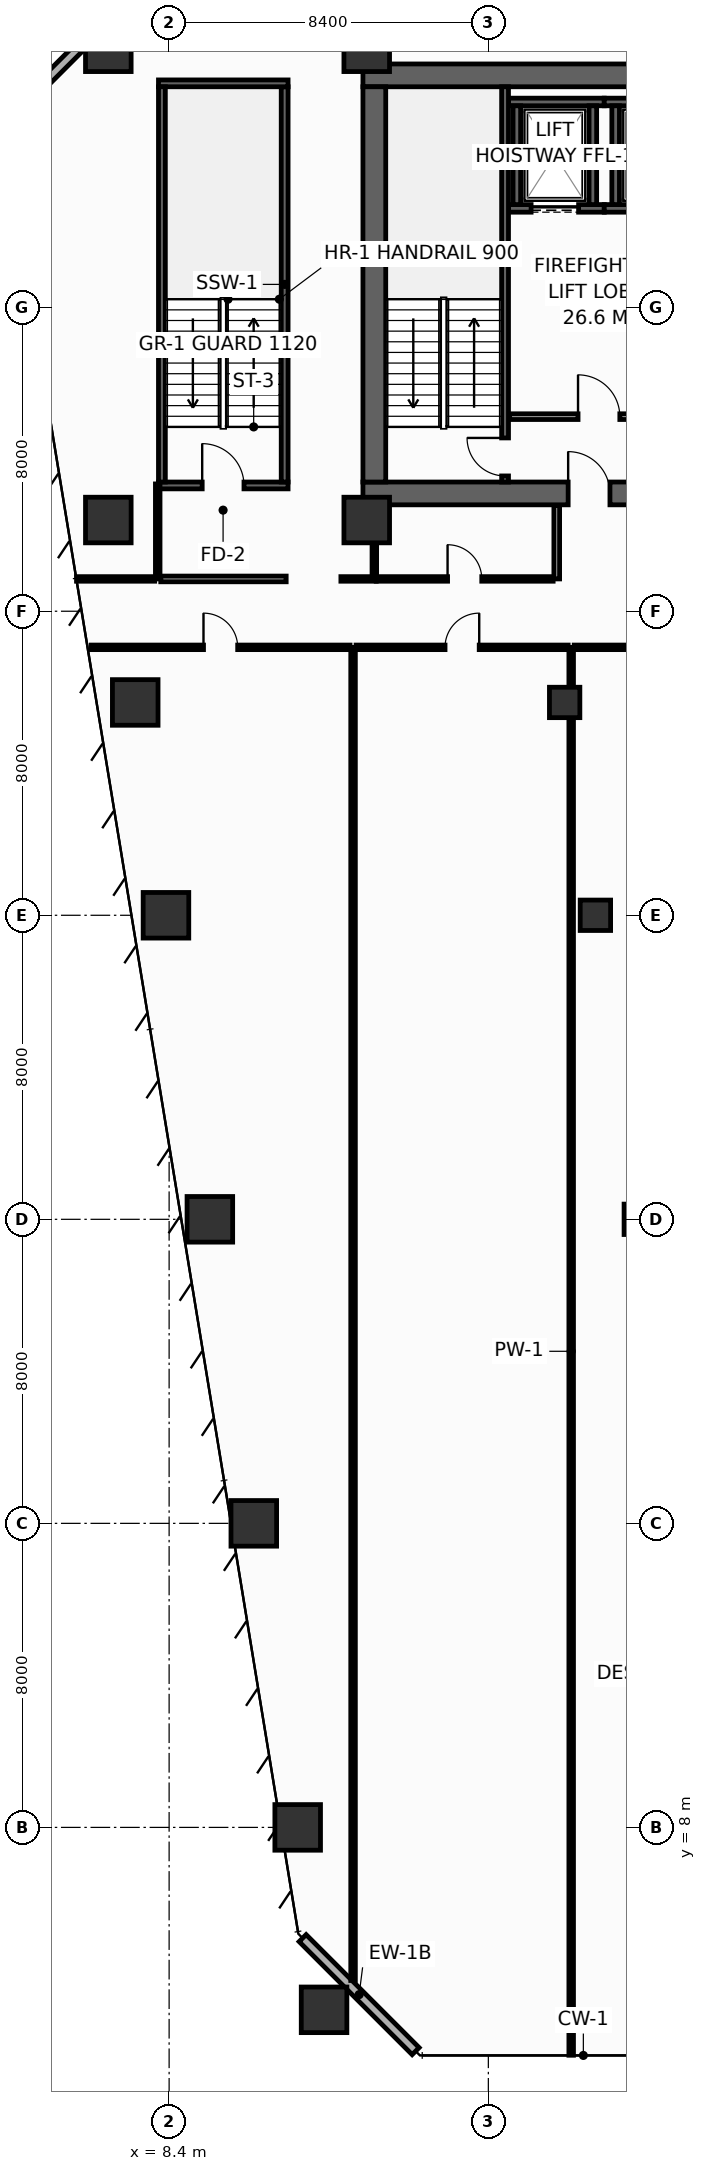
"""IFC4 building model, lengths in metres.
Left out: names, types, materials, properties, quantities, classifications, styles, units other than length and angle.
Written with IfcOpenShell. Run it as: python <this file> out.ifc"""

import sys

from ifc_helpers import new_model, si_unit, direction, frame, frame_2d, origin, origin_2d, place, context, subcontext, project, spatial, rectangle, hollow_rectangle, extrude, element, fill, save


model = new_model("IFC4")
c1 = context("Model", 3, precision=1e-05, world=origin(), true_north=direction((0.0, 1.0)))
c2 = subcontext(c1, "Body", "Model", "MODEL_VIEW")
j1 = project(units=[si_unit("LENGTHUNIT", "METRE"), si_unit("PLANEANGLEUNIT", "RADIAN")], contexts=[c1])
p1 = place(None, origin())
s1 = spatial("IfcSite", under=j1, at=p1, CompositionType="ELEMENT")
p2 = place(p1, origin())
s2 = spatial("IfcBuilding", under=s1, at=p2, CompositionType="ELEMENT")
p3 = place(p2, frame((0.0, 0.0, 73.6)))
s3 = spatial("IfcBuildingStorey", under=s2, at=p3, CompositionType="ELEMENT", Elevation=73.6)
p4 = place(p3, frame((13.5, 43.1, 0.0), z_axis=(0.0, 0.0, 1.0), x_axis=(1.0, 0.0, 0.0)))
e1 = element("IfcWall", 1, at=p4, inside=s3, PredefinedType="SHEAR", context=c2, shape_type="SweptSolid", body=[
    extrude(rectangle(XDim=32.9, YDim=0.6, at=frame_2d((16.45, 0.0))), origin(), (0.0, 0.0, 1.0), 4.15),
])
p5 = place(p4, frame((5.4, 0.0, 0.0)))
e2 = element("IfcOpeningElement", 2, at=p5, cuts=e1, PredefinedType="OPENING", context=c2, shape_type="SweptSolid", body=[
    extrude(rectangle(XDim=1.1, YDim=2.15, at=frame_2d((0.55, 1.075))), frame((0.0, 0.31, 0.0), z_axis=(0.0, -1.0, 0.0), x_axis=(1.0, 0.0, 0.0)), (0.0, 0.0, 1.0), 0.62),
])
p6 = place(p4, frame((25.6, 0.0, 0.0)))
e3 = element("IfcOpeningElement", 3, at=p6, cuts=e1, PredefinedType="OPENING", context=c2, shape_type="SweptSolid", body=[
    extrude(rectangle(XDim=1.1, YDim=2.15, at=frame_2d((0.55, 1.075))), frame((0.0, 0.31, 0.0), z_axis=(0.0, -1.0, 0.0), x_axis=(1.0, 0.0, 0.0)), (0.0, 0.0, 1.0), 0.62),
])
p7 = place(p3, frame((13.5, 54.1, 0.0), z_axis=(0.0, 0.0, 1.0), x_axis=(1.0, 0.0, 0.0)))
e4 = element("IfcWall", 4, at=p7, inside=s3, PredefinedType="SHEAR", context=c2, shape_type="SweptSolid", body=[
    extrude(rectangle(XDim=32.9, YDim=0.6, at=frame_2d((16.45, 0.0))), origin(), (0.0, 0.0, 1.0), 4.15),
])
p8 = place(p3, frame((13.8, 43.4, 0.0), z_axis=(0.0, 0.0, 1.0), x_axis=(0.0, 1.0, 0.0)))
e5 = element("IfcWall", 5, at=p8, inside=s3, PredefinedType="SHEAR", context=c2, shape_type="SweptSolid", body=[
    extrude(rectangle(XDim=10.4, YDim=0.6, at=frame_2d((5.2, 0.0))), origin(), (0.0, 0.0, 1.0), 4.15),
])
for number, where, z_axis, x_axis in (
    (6, (6.8, 54.8, 0.0), (0.0, 0.0, 1.0), (1.0, 0.0, 0.0)),
    (7, (13.6, 54.8, 0.0), (0.0, 0.0, 1.0), (1.0, 0.0, 0.0)),
    (8, (6.8, 42.4, 0.0), (0.0, 0.0, 1.0), (1.0, 0.0, 0.0)),
    (9, (13.6, 42.4, 0.0), (0.0, 0.0, 1.0), (1.0, 0.0, 0.0)),
    (10, (12.477, 3.2, 0.0), (0.0, 0.0, 1.0), (1.0, 0.0, 0.0)),
    (11, (11.783, 8.0, 0.0), (0.0, 0.0, 1.0), (1.0, 0.0, 0.0)),
    (12, (10.628, 16.0, 0.0), (0.0, 0.0, 1.0), (1.0, 0.0, 0.0)),
    (13, (9.472, 24.0, 0.0), (0.0, 0.0, 1.0), (1.0, 0.0, 0.0)),
):
    element("IfcColumn", number, at=place(p3, frame(where, z_axis=z_axis, x_axis=x_axis)), inside=s3, PredefinedType="COLUMN", context=c2, shape_type="SweptSolid", body=[
        extrude(hollow_rectangle(XDim=1.2, YDim=1.2, WallThickness=0.055, at=origin_2d()), origin(), (0.0, 0.0, 1.0), 4.4),
    ])
p9 = place(p3, frame((20.772, 24.0, 0.0), z_axis=(0.0, 0.0, 1.0), x_axis=(1.0, 0.0, 0.0)))
e14 = element("IfcColumn", 14, at=p9, inside=s3, PredefinedType="COLUMN", context=c2, shape_type="SweptSolid", body=[
    extrude(hollow_rectangle(XDim=0.8, YDim=0.8, WallThickness=0.036, at=origin_2d()), origin(), (0.0, 0.0, 1.0), 4.4),
])
p10 = place(p3, frame((8.317, 32.0, 0.0), z_axis=(0.0, 0.0, 1.0), x_axis=(1.0, 0.0, 0.0)))
e15 = element("IfcColumn", 15, at=p10, inside=s3, PredefinedType="COLUMN", context=c2, shape_type="SweptSolid", body=[
    extrude(hollow_rectangle(XDim=1.2, YDim=1.2, WallThickness=0.055, at=origin_2d()), origin(), (0.0, 0.0, 1.0), 4.4),
])
p11 = place(p3, frame((19.617, 32.0, 0.0), z_axis=(0.0, 0.0, 1.0), x_axis=(1.0, 0.0, 0.0)))
e16 = element("IfcColumn", 16, at=p11, inside=s3, PredefinedType="COLUMN", context=c2, shape_type="SweptSolid", body=[
    extrude(hollow_rectangle(XDim=0.8, YDim=0.8, WallThickness=0.036, at=origin_2d()), origin(), (0.0, 0.0, 1.0), 4.4),
])
p12 = place(p3, frame((7.508, 37.6, 0.0), z_axis=(0.0, 0.0, 1.0), x_axis=(1.0, 0.0, 0.0)))
e17 = element("IfcColumn", 17, at=p12, inside=s3, PredefinedType="COLUMN", context=c2, shape_type="SweptSolid", body=[
    extrude(hollow_rectangle(XDim=1.2, YDim=1.2, WallThickness=0.055, at=origin_2d()), origin(), (0.0, 0.0, 1.0), 4.4),
])
p13 = place(p3, frame((18.808, 37.6, 0.0), z_axis=(0.0, 0.0, 1.0), x_axis=(1.0, 0.0, 0.0)))
e18 = element("IfcColumn", 18, at=p13, inside=s3, PredefinedType="COLUMN", context=c2, shape_type="SweptSolid", body=[
    extrude(hollow_rectangle(XDim=0.8, YDim=0.8, WallThickness=0.036, at=origin_2d()), origin(), (0.0, 0.0, 1.0), 4.4),
])
p14 = place(p3, frame((17.33, 50.6, 0.0), z_axis=(0.0, 0.0, 1.0), x_axis=(1.0, 0.0, 0.0)))
e19 = element("IfcWall", 19, at=p14, inside=s3, PredefinedType="SHEAR", context=c2, shape_type="SweptSolid", body=[
    extrude(rectangle(XDim=2.52, YDim=0.2, at=frame_2d((1.26, 0.0))), origin(), (0.0, 0.0, 1.0), 4.15),
])
p15 = place(p14, frame((0.595, 0.0, 0.0)))
e20 = element("IfcOpeningElement", 20, at=p15, cuts=e19, PredefinedType="OPENING", context=c2, shape_type="SweptSolid", body=[
    extrude(rectangle(XDim=1.25, YDim=2.3, at=frame_2d((0.625, 1.15))), frame((0.0, 0.11, 0.0), z_axis=(0.0, -1.0, 0.0), x_axis=(1.0, 0.0, 0.0)), (0.0, 0.0, 1.0), 0.22),
])
p16 = place(p3, frame((17.33, 53.4, 0.0), z_axis=(0.0, 0.0, 1.0), x_axis=(1.0, 0.0, 0.0)))
e21 = element("IfcWall", 21, at=p16, inside=s3, PredefinedType="SHEAR", context=c2, shape_type="SweptSolid", body=[
    extrude(rectangle(XDim=2.52, YDim=0.2, at=frame_2d((1.26, 0.0))), origin(), (0.0, 0.0, 1.0), 4.15),
])
for number, where, z_axis, x_axis in (
    (22, (17.55, 50.7, 0.0), (0.0, 0.0, 1.0), (0.0, 1.0, 0.0)),
    (23, (19.55, 50.7, 0.0), (0.0, 0.0, 1.0), (0.0, 1.0, 0.0)),
):
    element("IfcWall", number, at=place(p3, frame(where, z_axis=z_axis, x_axis=x_axis)), inside=s3, PredefinedType="SHEAR", context=c2, shape_type="SweptSolid", body=[
        extrude(rectangle(XDim=2.6, YDim=0.2, at=frame_2d((1.3, 0.0))), origin(), (0.0, 0.0, 1.0), 4.15),
    ])
p17 = place(p3, frame((19.85, 50.6, 0.0), z_axis=(0.0, 0.0, 1.0), x_axis=(1.0, 0.0, 0.0)))
e24 = element("IfcWall", 24, at=p17, inside=s3, PredefinedType="SHEAR", context=c2, shape_type="SweptSolid", body=[
    extrude(rectangle(XDim=2.65, YDim=0.2, at=frame_2d((1.325, 0.0))), origin(), (0.0, 0.0, 1.0), 4.15),
])
p18 = place(p17, frame((0.675, 0.0, 0.0)))
e25 = element("IfcOpeningElement", 25, at=p18, cuts=e24, PredefinedType="OPENING", context=c2, shape_type="SweptSolid", body=[
    extrude(rectangle(XDim=1.25, YDim=2.3, at=frame_2d((0.625, 1.15))), frame((0.0, 0.11, 0.0), z_axis=(0.0, -1.0, 0.0), x_axis=(1.0, 0.0, 0.0)), (0.0, 0.0, 1.0), 0.22),
])
p19 = place(p3, frame((19.85, 53.4, 0.0), z_axis=(0.0, 0.0, 1.0), x_axis=(1.0, 0.0, 0.0)))
e26 = element("IfcWall", 26, at=p19, inside=s3, PredefinedType="SHEAR", context=c2, shape_type="SweptSolid", body=[
    extrude(rectangle(XDim=2.65, YDim=0.2, at=frame_2d((1.325, 0.0))), origin(), (0.0, 0.0, 1.0), 4.15),
])
p20 = place(p3, frame((20.15, 50.7, 0.0), z_axis=(0.0, 0.0, 1.0), x_axis=(0.0, 1.0, 0.0)))
e27 = element("IfcWall", 27, at=p20, inside=s3, PredefinedType="SHEAR", context=c2, shape_type="SweptSolid", body=[
    extrude(rectangle(XDim=2.6, YDim=0.2, at=frame_2d((1.3, 0.0))), origin(), (0.0, 0.0, 1.0), 4.15),
])
p21 = place(p3, frame((17.24, 43.4, 0.0), z_axis=(0.0, 0.0, 1.0), x_axis=(0.0, 1.0, 0.0)))
e28 = element("IfcWall", 28, at=p21, inside=s3, PredefinedType="SHEAR", context=c2, shape_type="SweptSolid", body=[
    extrude(rectangle(XDim=10.4, YDim=0.18, at=frame_2d((5.2, 0.0))), origin(), (0.0, 0.0, 1.0), 4.15),
])
p22 = place(p21, frame((0.16, 0.0, 0.0)))
e29 = element("IfcOpeningElement", 29, at=p22, cuts=e28, PredefinedType="OPENING", context=c2, shape_type="SweptSolid", body=[
    extrude(rectangle(XDim=1.0, YDim=2.15, at=frame_2d((0.5, 1.075))), frame((0.0, 0.1, 0.0), z_axis=(0.0, -1.0, 0.0), x_axis=(1.0, 0.0, 0.0)), (0.0, 0.0, 1.0), 0.2),
])
p23 = place(p3, frame((8.12, 43.31, 0.0), z_axis=(0.0, 0.0, 1.0), x_axis=(1.0, 0.0, 0.0)))
e30 = element("IfcWall", 30, at=p23, inside=s3, PredefinedType="SHEAR", context=c2, shape_type="SweptSolid", body=[
    extrude(rectangle(XDim=3.41, YDim=0.18, at=frame_2d((1.705, 0.0))), origin(), (0.0, 0.0, 1.0), 4.15),
])
p24 = place(p23, frame((1.15, 0.0, 0.0)))
e31 = element("IfcOpeningElement", 31, at=p24, cuts=e30, PredefinedType="OPENING", context=c2, shape_type="SweptSolid", body=[
    extrude(rectangle(XDim=1.1, YDim=2.15, at=frame_2d((0.55, 1.075))), frame((0.0, 0.1, 0.0), z_axis=(0.0, -1.0, 0.0), x_axis=(1.0, 0.0, 0.0)), (0.0, 0.0, 1.0), 0.2),
])
p25 = place(p3, frame((11.44, 43.4, 0.0), z_axis=(0.0, 0.0, 1.0), x_axis=(0.0, 1.0, 0.0)))
e32 = element("IfcWall", 32, at=p25, inside=s3, PredefinedType="SHEAR", context=c2, shape_type="SweptSolid", body=[
    extrude(rectangle(XDim=10.4, YDim=0.18, at=frame_2d((5.2, 0.0))), origin(), (0.0, 0.0, 1.0), 4.15),
])
p26 = place(p3, frame((11.53, 53.89, 0.0), z_axis=(0.0, 0.0, 1.0), x_axis=(-1.0, 0.0, 0.0)))
e33 = element("IfcWall", 33, at=p26, inside=s3, PredefinedType="SHEAR", context=c2, shape_type="SweptSolid", body=[
    extrude(rectangle(XDim=3.41, YDim=0.18, at=frame_2d((1.705, 0.0))), origin(), (0.0, 0.0, 1.0), 4.15),
])
p27 = place(p3, frame((8.21, 53.8, 0.0), z_axis=(0.0, 0.0, 1.0), x_axis=(0.0, -1.0, 0.0)))
e34 = element("IfcWall", 34, at=p27, inside=s3, PredefinedType="SHEAR", context=c2, shape_type="SweptSolid", body=[
    extrude(rectangle(XDim=10.4, YDim=0.18, at=frame_2d((5.2, 0.0))), origin(), (0.0, 0.0, 1.0), 4.15),
])
p28 = place(p3, frame((17.36, 45.12, 0.0), z_axis=(0.0, 0.0, 1.0), x_axis=(1.0, 0.0, 0.0)))
e35 = element("IfcWall", 35, at=p28, inside=s3, PredefinedType="PARTITIONING", context=c2, shape_type="SweptSolid", body=[
    extrude(rectangle(XDim=5.14, YDim=0.15, at=frame_2d((2.57, 0.0))), origin(), (0.0, 0.0, 1.0), 4.15),
])
p29 = place(p28, frame((1.8, 0.0, 0.0)))
e36 = element("IfcOpeningElement", 36, at=p29, cuts=e35, PredefinedType="OPENING", context=c2, shape_type="SweptSolid", body=[
    extrude(rectangle(XDim=1.1, YDim=2.15, at=frame_2d((0.55, 1.075))), frame((0.0, 0.085, 0.0), z_axis=(0.0, -1.0, 0.0), x_axis=(1.0, 0.0, 0.0)), (0.0, 0.0, 1.0), 0.17),
])
for number, where, z_axis, x_axis in (
    (37, (11.913, 5.087, 0.0), (0.0, 0.0, 1.0), (0.707, -0.707, 0.0)),
    (38, (7.087, 55.887, 0.0), (0.0, 0.0, 1.0), (-0.707, -0.707, 0.0)),
):
    element("IfcWall", number, at=place(p3, frame(where, z_axis=z_axis, x_axis=x_axis)), inside=s3, PredefinedType="STANDARD", context=c2, shape_type="SweptSolid", body=[
        extrude(rectangle(XDim=4.206, YDim=0.26, at=frame_2d((2.103, 0.0))), origin(), (0.0, 0.0, 1.0), 4.15),
    ])
p30 = place(p3, frame((12.92, 40.85, 0.0), z_axis=(0.0, 0.0, 1.0), x_axis=(1.0, 0.0, 0.0)))
e39 = element("IfcWall", 39, at=p30, inside=s3, PredefinedType="PARTITIONING", context=c2, shape_type="SweptSolid", body=[
    extrude(rectangle(XDim=0.93, YDim=0.12, at=frame_2d((0.465, 0.0))), origin(), (0.0, 0.0, 1.0), 4.15),
])
p31 = place(p3, frame((13.8, 40.93, 0.0), z_axis=(0.0, 0.0, 1.0), x_axis=(0.0, 1.0, 0.0)))
e40 = element("IfcWall", 40, at=p31, inside=s3, PredefinedType="PARTITIONING", context=c2, shape_type="SweptSolid", body=[
    extrude(rectangle(XDim=1.85, YDim=0.12, at=frame_2d((0.925, 0.0))), origin(), (0.0, 0.0, 1.0), 4.15),
])
p32 = place(p3, frame((8.1, 40.85, 0.0), z_axis=(0.0, 0.0, 1.0), x_axis=(0.0, 1.0, 0.0)))
e41 = element("IfcWall", 41, at=p32, inside=s3, PredefinedType="PARTITIONING", context=c2, shape_type="SweptSolid", body=[
    extrude(rectangle(XDim=2.5, YDim=0.12, at=frame_2d((1.25, 0.0))), origin(), (0.0, 0.0, 1.0), 3.335),
])
p33 = place(p3, frame((8.18, 40.85, 0.0), z_axis=(0.0, 0.0, 1.0), x_axis=(1.0, 0.0, 0.0)))
e42 = element("IfcWall", 42, at=p33, inside=s3, PredefinedType="PARTITIONING", context=c2, shape_type="SweptSolid", body=[
    extrude(rectangle(XDim=3.3, YDim=0.15, at=frame_2d((1.65, 0.0))), origin(), (0.0, 0.0, 1.0), 4.15),
])
p34 = place(p3, frame((5.963, 40.85, 0.0), z_axis=(0.0, 0.0, 1.0), x_axis=(1.0, 0.0, 0.0)))
e43 = element("IfcWall", 43, at=p34, inside=s3, PredefinedType="PARTITIONING", context=c2, shape_type="SweptSolid", body=[
    extrude(rectangle(XDim=2.057, YDim=0.12, at=frame_2d((1.028, 0.0))), origin(), (0.0, 0.0, 1.0), 3.635),
])
p35 = place(p3, frame((18.6, 40.85, 0.0), z_axis=(0.0, 0.0, 1.0), x_axis=(0.0, 1.0, 0.0)))
e44 = element("IfcWall", 44, at=p35, inside=s3, PredefinedType="PARTITIONING", context=c2, shape_type="SweptSolid", body=[
    extrude(rectangle(XDim=1.93, YDim=0.15, at=frame_2d((0.965, 0.0))), origin(), (0.0, 0.0, 1.0), 4.15),
])
p36 = place(p3, frame((13.85, 40.85, 0.0), z_axis=(0.0, 0.0, 1.0), x_axis=(1.0, 0.0, 0.0)))
e45 = element("IfcWall", 45, at=p36, inside=s3, PredefinedType="PARTITIONING", context=c2, shape_type="SweptSolid", body=[
    extrude(rectangle(XDim=4.655, YDim=0.12, at=frame_2d((2.327, 0.0))), origin(), (0.0, 0.0, 1.0), 4.15),
])
p37 = place(p36, frame((1.877, 0.0, 0.0)))
e46 = element("IfcOpeningElement", 46, at=p37, cuts=e45, PredefinedType="OPENING", context=c2, shape_type="SweptSolid", body=[
    extrude(rectangle(XDim=0.9, YDim=2.1, at=frame_2d((0.45, 1.05))), frame((0.0, 0.07, 0.0), z_axis=(0.0, -1.0, 0.0), x_axis=(1.0, 0.0, 0.0)), (0.0, 0.0, 1.0), 0.14),
])
p38 = place(p3, frame((13.24, 3.972, 0.0), z_axis=(0.0, 0.0, 1.0), x_axis=(0.0, 1.0, 0.0)))
e47 = element("IfcWall", 47, at=p38, inside=s3, PredefinedType="PARTITIONING", context=c2, shape_type="SweptSolid", body=[
    extrude(rectangle(XDim=35.078, YDim=0.12, at=frame_2d((17.539, 0.0))), origin(), (0.0, 0.0, 1.0), 3.335),
])
p39 = place(p3, frame((18.98, 2.005, 0.0), z_axis=(0.0, 0.0, 1.0), x_axis=(0.0, 1.0, 0.0)))
e48 = element("IfcWall", 48, at=p39, inside=s3, PredefinedType="PARTITIONING", context=c2, shape_type="SweptSolid", body=[
    extrude(rectangle(XDim=37.045, YDim=0.12, at=frame_2d((18.522, 0.0))), origin(), (0.0, 0.0, 1.0), 3.335),
])
p40 = place(p3, frame((6.348, 39.05, 0.0), z_axis=(0.0, 0.0, 1.0), x_axis=(1.0, 0.0, 0.0)))
e49 = element("IfcWall", 49, at=p40, inside=s3, PredefinedType="PARTITIONING", context=c2, shape_type="SweptSolid", body=[
    extrude(rectangle(XDim=6.812, YDim=0.12, at=frame_2d((3.406, 0.0))), origin(), (0.0, 0.0, 1.0), 3.635),
])
p41 = place(p40, frame((2.956, 0.0, 0.0)))
e50 = element("IfcOpeningElement", 50, at=p41, cuts=e49, PredefinedType="OPENING", context=c2, shape_type="SweptSolid", body=[
    extrude(rectangle(XDim=0.9, YDim=2.1, at=frame_2d((0.45, 1.05))), frame((0.0, 0.07, 0.0), z_axis=(0.0, -1.0, 0.0), x_axis=(1.0, 0.0, 0.0)), (0.0, 0.0, 1.0), 0.14),
])
p42 = place(p3, frame((13.32, 39.05, 0.0), z_axis=(0.0, 0.0, 1.0), x_axis=(1.0, 0.0, 0.0)))
e51 = element("IfcWall", 51, at=p42, inside=s3, PredefinedType="PARTITIONING", context=c2, shape_type="SweptSolid", body=[
    extrude(rectangle(XDim=5.58, YDim=0.12, at=frame_2d((2.79, 0.0))), origin(), (0.0, 0.0, 1.0), 4.15),
])
p43 = place(p42, frame((2.34, 0.0, 0.0)))
e52 = element("IfcOpeningElement", 52, at=p43, cuts=e51, PredefinedType="OPENING", context=c2, shape_type="SweptSolid", body=[
    extrude(rectangle(XDim=0.9, YDim=2.1, at=frame_2d((0.45, 1.05))), frame((0.0, 0.07, 0.0), z_axis=(0.0, -1.0, 0.0), x_axis=(1.0, 0.0, 0.0)), (0.0, 0.0, 1.0), 0.14),
])
p44 = place(p3, frame((19.06, 39.05, 0.0), z_axis=(0.0, 0.0, 1.0), x_axis=(1.0, 0.0, 0.0)))
e53 = element("IfcWall", 53, at=p44, inside=s3, PredefinedType="PARTITIONING", context=c2, shape_type="SweptSolid", body=[
    extrude(rectangle(XDim=4.79, YDim=0.12, at=frame_2d((2.395, 0.0))), origin(), (0.0, 0.0, 1.0), 3.335),
])
p45 = place(p44, frame((1.945, 0.0, 0.0)))
e54 = element("IfcOpeningElement", 54, at=p45, cuts=e53, PredefinedType="OPENING", context=c2, shape_type="SweptSolid", body=[
    extrude(rectangle(XDim=0.9, YDim=2.1, at=frame_2d((0.45, 1.05))), frame((0.0, 0.07, 0.0), z_axis=(0.0, -1.0, 0.0), x_axis=(1.0, 0.0, 0.0)), (0.0, 0.0, 1.0), 0.14),
])
p46 = place(p15, origin())
e55 = element("IfcDoor", 55, at=p46, inside=s3, OperationType="SLIDING_TO_LEFT", PredefinedType="DOOR", context=c2, shape_type="SweptSolid", body=[
    extrude(rectangle(XDim=1.25, YDim=2.3, at=frame_2d((0.625, 1.15))), frame((0.0, 0.025, 0.0), z_axis=(0.0, -1.0, 0.0), x_axis=(1.0, 0.0, 0.0)), (0.0, 0.0, 1.0), 0.05),
])
fill(e20, e55)
p47 = place(p22, origin())
e56 = element("IfcDoor", 56, at=p47, inside=s3, OperationType="SINGLE_SWING_RIGHT", PredefinedType="DOOR", context=c2, shape_type="SweptSolid", body=[
    extrude(rectangle(XDim=1.0, YDim=2.15, at=frame_2d((0.5, 1.075))), frame((0.0, 0.025, 0.0), z_axis=(0.0, -1.0, 0.0), x_axis=(1.0, 0.0, 0.0)), (0.0, 0.0, 1.0), 0.05),
])
fill(e29, e56)
p48 = place(p24, origin())
e57 = element("IfcDoor", 57, at=p48, inside=s3, OperationType="SINGLE_SWING_LEFT", PredefinedType="DOOR", context=c2, shape_type="SweptSolid", body=[
    extrude(rectangle(XDim=1.1, YDim=2.15, at=frame_2d((0.55, 1.075))), frame((0.0, 0.025, 0.0), z_axis=(0.0, -1.0, 0.0), x_axis=(1.0, 0.0, 0.0)), (0.0, 0.0, 1.0), 0.05),
])
fill(e31, e57)
p49 = place(p29, origin())
e58 = element("IfcDoor", 58, at=p49, inside=s3, OperationType="SINGLE_SWING_LEFT", PredefinedType="DOOR", context=c2, shape_type="SweptSolid", body=[
    extrude(rectangle(XDim=1.1, YDim=2.15, at=frame_2d((0.55, 1.075))), frame((0.0, 0.025, 0.0), z_axis=(0.0, -1.0, 0.0), x_axis=(1.0, 0.0, 0.0)), (0.0, 0.0, 1.0), 0.05),
])
fill(e36, e58)
p50 = place(p5, origin())
e59 = element("IfcDoor", 59, at=p50, inside=s3, OperationType="SINGLE_SWING_LEFT", PredefinedType="DOOR", context=c2, shape_type="SweptSolid", body=[
    extrude(rectangle(XDim=1.1, YDim=2.15, at=frame_2d((0.55, 1.075))), frame((0.0, 0.025, 0.0), z_axis=(0.0, -1.0, 0.0), x_axis=(1.0, 0.0, 0.0)), (0.0, 0.0, 1.0), 0.05),
])
fill(e2, e59)
p51 = place(p37, origin())
e60 = element("IfcDoor", 60, at=p51, inside=s3, OperationType="SINGLE_SWING_LEFT", PredefinedType="DOOR", context=c2, shape_type="SweptSolid", body=[
    extrude(rectangle(XDim=0.9, YDim=2.1, at=frame_2d((0.45, 1.05))), frame((0.0, 0.025, 0.0), z_axis=(0.0, -1.0, 0.0), x_axis=(1.0, 0.0, 0.0)), (0.0, 0.0, 1.0), 0.05),
])
fill(e46, e60)
p52 = place(p41, origin())
e61 = element("IfcDoor", 61, at=p52, inside=s3, OperationType="SINGLE_SWING_LEFT", PredefinedType="DOOR", context=c2, shape_type="SweptSolid", body=[
    extrude(rectangle(XDim=0.9, YDim=2.1, at=frame_2d((0.45, 1.05))), frame((0.0, 0.025, 0.0), z_axis=(0.0, -1.0, 0.0), x_axis=(1.0, 0.0, 0.0)), (0.0, 0.0, 1.0), 0.05),
])
fill(e50, e61)
p53 = place(p43, origin())
e62 = element("IfcDoor", 62, at=p53, inside=s3, OperationType="SINGLE_SWING_RIGHT", PredefinedType="DOOR", context=c2, shape_type="SweptSolid", body=[
    extrude(rectangle(XDim=0.9, YDim=2.1, at=frame_2d((0.45, 1.05))), frame((0.0, 0.025, 0.0), z_axis=(0.0, -1.0, 0.0), x_axis=(1.0, 0.0, 0.0)), (0.0, 0.0, 1.0), 0.05),
])
fill(e52, e62)
save(model, sys.argv[1])
